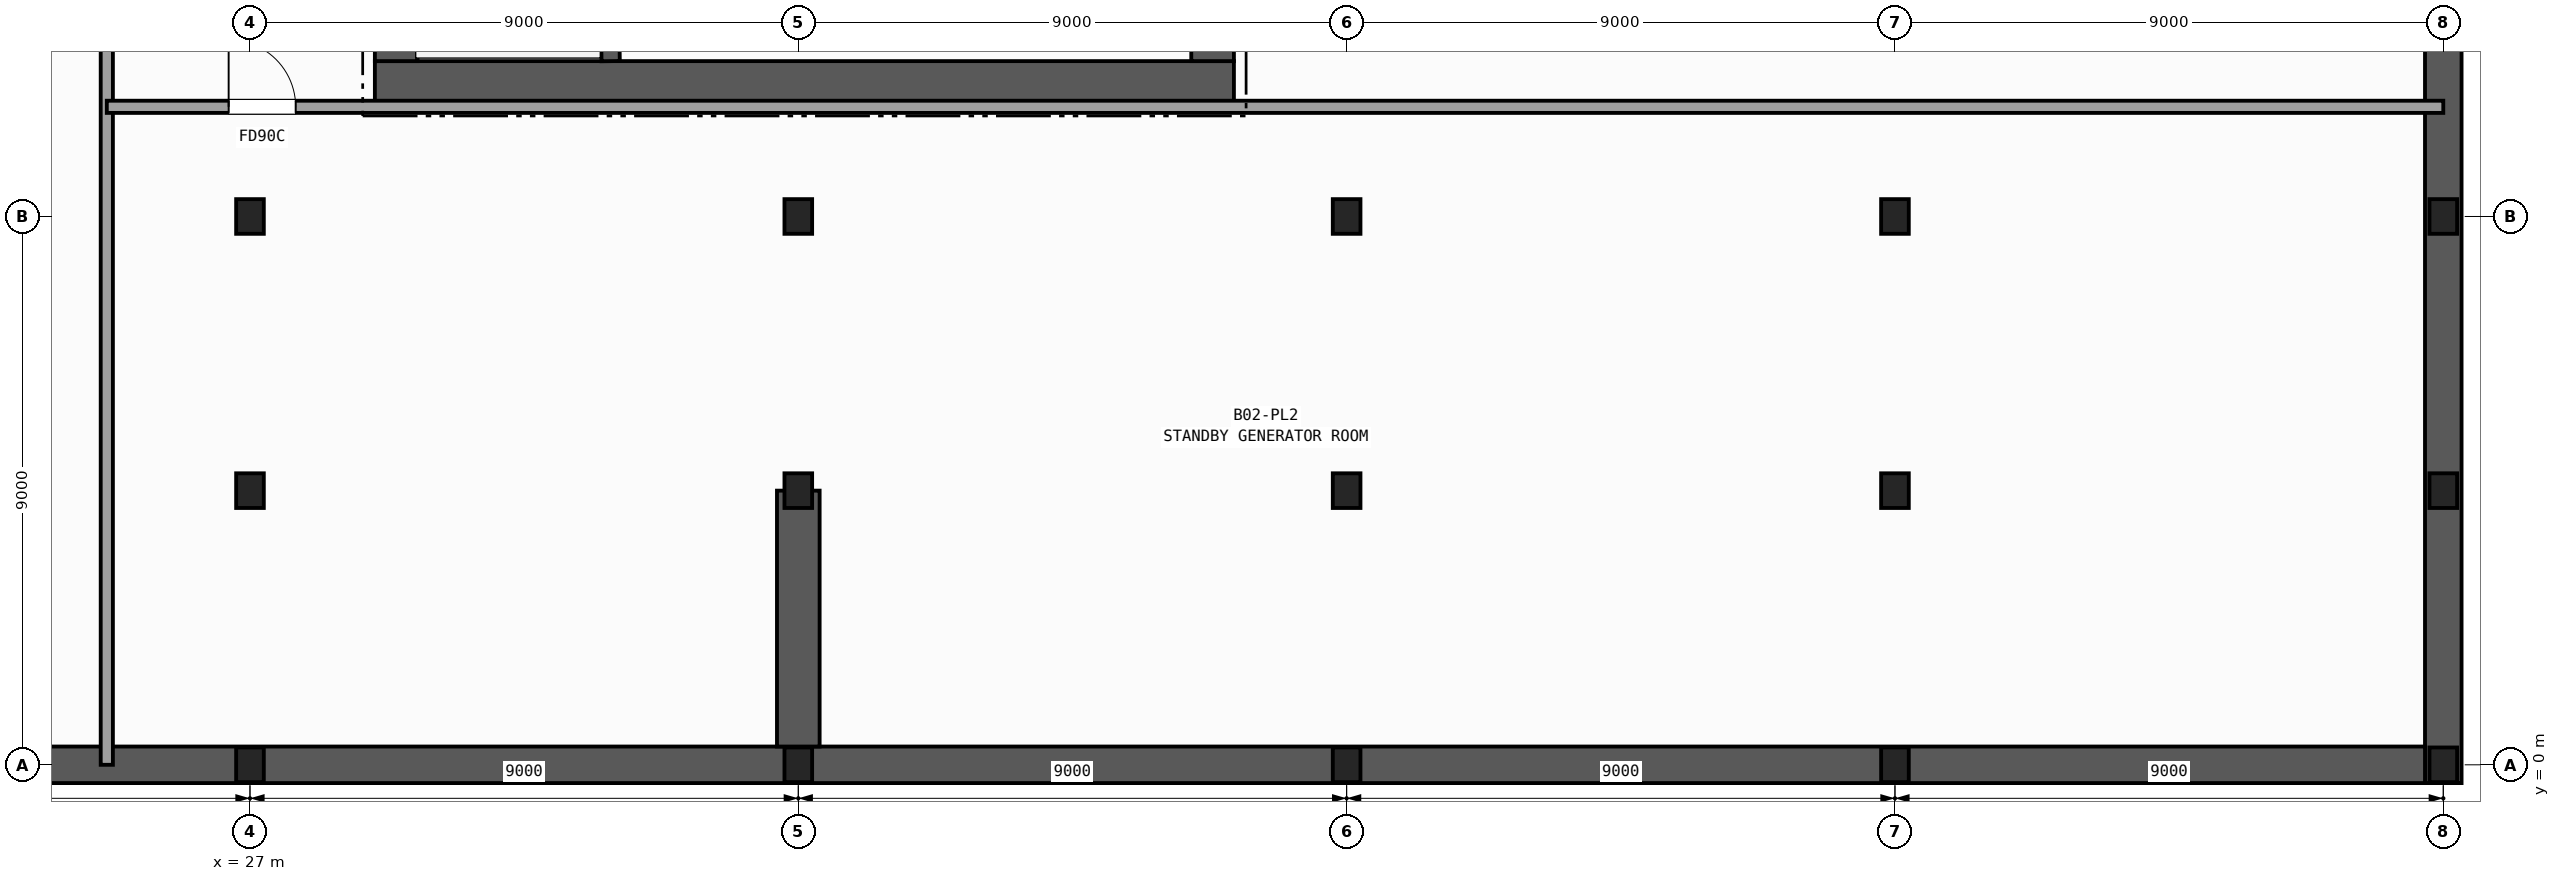
"""IFC4 building model, lengths in metres.
Left out: names, types, materials, properties, quantities, classifications, styles, units other than length and angle.
Written with IfcOpenShell. Run it as: python <this file> out.ifc"""

import sys

from ifc_helpers import new_model, si_unit, direction, frame, frame_2d, origin, origin_2d, place, context, subcontext, project, spatial, rectangle, i_section, extrude, element, fill, save


model = new_model("IFC4")
c1 = context("Model", 3, precision=1e-05, world=origin(), true_north=direction((0.0, 1.0)))
c2 = subcontext(c1, "Body", "Model", "MODEL_VIEW")
j1 = project(units=[si_unit("LENGTHUNIT", "METRE"), si_unit("PLANEANGLEUNIT", "RADIAN")], contexts=[c1])
p1 = place(None, origin())
s1 = spatial("IfcSite", under=j1, at=p1, CompositionType="ELEMENT")
p2 = place(p1, origin())
s2 = spatial("IfcBuilding", under=s1, at=p2, CompositionType="ELEMENT")
p3 = place(p2, frame((0.0, 0.0, -9.0)))
s3 = spatial("IfcBuildingStorey", under=s2, at=p3, CompositionType="ELEMENT", Elevation=-9.0)
for number, where, z_axis, x_axis in (
    (1, (27.0, 0.0, 0.0), (0.0, 0.0, 1.0), (1.0, 0.0, 0.0)),
    (2, (27.0, 9.0, 0.0), (0.0, 0.0, 1.0), (1.0, 0.0, 0.0)),
    (3, (36.0, 0.0, 0.0), (0.0, 0.0, 1.0), (1.0, 0.0, 0.0)),
    (4, (36.0, 9.0, 0.0), (0.0, 0.0, 1.0), (1.0, 0.0, 0.0)),
    (5, (45.0, 0.0, 0.0), (0.0, 0.0, 1.0), (1.0, 0.0, 0.0)),
    (6, (45.0, 9.0, 0.0), (0.0, 0.0, 1.0), (1.0, 0.0, 0.0)),
    (7, (54.0, 0.0, 0.0), (0.0, 0.0, 1.0), (1.0, 0.0, 0.0)),
    (8, (54.0, 9.0, 0.0), (0.0, 0.0, 1.0), (1.0, 0.0, 0.0)),
    (9, (63.0, 0.0, 0.0), (0.0, 0.0, 1.0), (1.0, 0.0, 0.0)),
    (10, (63.0, 9.0, 0.0), (0.0, 0.0, 1.0), (1.0, 0.0, 0.0)),
    (11, (27.0, 4.5, 0.0), (0.0, 0.0, 1.0), (1.0, 0.0, 0.0)),
    (12, (36.0, 4.5, 0.0), (0.0, 0.0, 1.0), (1.0, 0.0, 0.0)),
    (13, (45.0, 4.5, 0.0), (0.0, 0.0, 1.0), (1.0, 0.0, 0.0)),
    (14, (54.0, 4.5, 0.0), (0.0, 0.0, 1.0), (1.0, 0.0, 0.0)),
    (15, (63.0, 4.5, 0.0), (0.0, 0.0, 1.0), (1.0, 0.0, 0.0)),
):
    element("IfcColumn", number, at=place(p3, frame(where, z_axis=z_axis, x_axis=x_axis)), inside=s3, PredefinedType="COLUMN", context=c2, shape_type="SweptSolid", body=[
        extrude(i_section(OverallWidth=0.454, OverallDepth=0.569, WebThickness=0.078, FlangeThickness=0.125, FilletRadius=0.015, at=origin_2d()), origin(), (0.0, 0.0, 1.0), 4.5),
    ])
p4 = place(p3, frame((63.0, 54.3, 0.0), z_axis=(0.0, 0.0, 1.0), x_axis=(0.0, -1.0, 0.0)))
e16 = element("IfcWall", 16, at=p4, inside=s3, PredefinedType="SOLIDWALL", context=c2, shape_type="SweptSolid", body=[
    extrude(rectangle(XDim=54.6, YDim=0.6, at=frame_2d((27.3, 0.0))), origin(), (0.0, 0.0, 1.0), 4.15),
])
p5 = place(p3, frame((62.7, 0.0, 0.0), z_axis=(0.0, 0.0, 1.0), x_axis=(-1.0, 0.0, 0.0)))
e17 = element("IfcWall", 17, at=p5, inside=s3, PredefinedType="SOLIDWALL", context=c2, shape_type="SweptSolid", body=[
    extrude(rectangle(XDim=62.4, YDim=0.6, at=frame_2d((31.2, 0.0))), origin(), (0.0, 0.0, 1.0), 4.15),
])
p6 = place(p3, frame((36.0, 0.3, 0.0), z_axis=(0.0, 0.0, 1.0), x_axis=(0.0, 1.0, 0.0)))
e18 = element("IfcWall", 18, at=p6, inside=s3, PredefinedType="SHEAR", context=c2, shape_type="SweptSolid", body=[
    extrude(rectangle(XDim=4.2, YDim=0.7, at=frame_2d((2.1, 0.0))), origin(), (0.0, 0.0, 1.0), 4.15),
])
p7 = place(p3, frame((29.05, 11.2, 0.0), z_axis=(0.0, 0.0, 1.0), x_axis=(1.0, 0.0, 0.0)))
e19 = element("IfcWall", 19, at=p7, inside=s3, PredefinedType="SHEAR", context=c2, shape_type="SweptSolid", body=[
    extrude(rectangle(XDim=14.1, YDim=0.7, at=frame_2d((7.05, 0.0))), origin(), (0.0, 0.0, 1.0), 4.15),
])
p8 = place(p3, frame((29.4, 24.25, 0.0), z_axis=(0.0, 0.0, 1.0), x_axis=(0.0, -1.0, 0.0)))
e20 = element("IfcWall", 20, at=p8, inside=s3, PredefinedType="SHEAR", context=c2, shape_type="SweptSolid", body=[
    extrude(rectangle(XDim=12.7, YDim=0.7, at=frame_2d((6.35, 0.0))), origin(), (0.0, 0.0, 1.0), 4.15),
])
p9 = place(p8, frame((1.35, 0.0, 0.0)))
e21 = element("IfcOpeningElement", 21, at=p9, cuts=e20, PredefinedType="OPENING", context=c2, shape_type="SweptSolid", body=[
    extrude(rectangle(XDim=1.35, YDim=2.15, at=frame_2d((0.675, 1.075))), frame((0.0, 0.36, 0.0), z_axis=(0.0, -1.0, 0.0), x_axis=(1.0, 0.0, 0.0)), (0.0, 0.0, 1.0), 0.72),
])
p10 = place(p3, frame((42.8, 11.55, 0.0), z_axis=(0.0, 0.0, 1.0), x_axis=(0.0, 1.0, 0.0)))
e22 = element("IfcWall", 22, at=p10, inside=s3, PredefinedType="SHEAR", context=c2, shape_type="SweptSolid", body=[
    extrude(rectangle(XDim=12.7, YDim=0.7, at=frame_2d((6.35, 0.0))), origin(), (0.0, 0.0, 1.0), 4.15),
])
p11 = place(p3, frame((32.92, 11.55, 0.0), z_axis=(0.0, 0.0, 1.0), x_axis=(-0.01331804616, 0.99991131089, 0.0)))
e23 = element("IfcWall", 23, at=p11, inside=s3, PredefinedType="SHEAR", context=c2, shape_type="SweptSolid", body=[
    extrude(rectangle(XDim=9.001, YDim=0.3, at=frame_2d((4.5, 0.0))), origin(), (0.0, 0.0, 1.0), 4.15),
])
p12 = place(p3, frame((24.65, 0.0, 0.0), z_axis=(0.0, 0.0, 1.0), x_axis=(0.0, 1.0, 0.0)))
e24 = element("IfcWall", 24, at=p12, inside=s3, PredefinedType="PARTITIONING", context=c2, shape_type="SweptSolid", body=[
    extrude(rectangle(XDim=28.2, YDim=0.2, at=frame_2d((14.1, 0.0))), origin(), (0.0, 0.0, 1.0), 3.203),
])
p13 = place(p12, frame((13.0, 0.0, 0.0)))
e25 = element("IfcOpeningElement", 25, at=p13, cuts=e24, PredefinedType="OPENING", context=c2, shape_type="SweptSolid", body=[
    extrude(rectangle(XDim=1.1, YDim=2.15, at=frame_2d((0.55, 1.075))), frame((0.0, 0.11, 0.0), z_axis=(0.0, -1.0, 0.0), x_axis=(1.0, 0.0, 0.0)), (0.0, 0.0, 1.0), 0.22),
])
p14 = place(p3, frame((24.65, 10.8, 0.0), z_axis=(0.0, 0.0, 1.0), x_axis=(1.0, 0.0, 0.0)))
e26 = element("IfcWall", 26, at=p14, inside=s3, PredefinedType="PARTITIONING", context=c2, shape_type="SweptSolid", body=[
    extrude(rectangle(XDim=38.35, YDim=0.2, at=frame_2d((19.175, 0.0))), origin(), (0.0, 0.0, 1.0), 3.275),
])
p15 = place(p14, frame((2.0, 0.0, 0.0)))
e27 = element("IfcOpeningElement", 27, at=p15, cuts=e26, PredefinedType="OPENING", context=c2, shape_type="SweptSolid", body=[
    extrude(rectangle(XDim=1.1, YDim=2.15, at=frame_2d((0.55, 1.075))), frame((0.0, 0.11, 0.0), z_axis=(0.0, -1.0, 0.0), x_axis=(1.0, 0.0, 0.0)), (0.0, 0.0, 1.0), 0.22),
])
p16 = place(p15, origin())
e28 = element("IfcDoor", 28, at=p16, inside=s3, OperationType="SINGLE_SWING_LEFT", PredefinedType="DOOR", context=c2, shape_type="SweptSolid", body=[
    extrude(rectangle(XDim=1.1, YDim=2.15, at=frame_2d((0.55, 1.075))), frame((0.0, 0.025, 0.0), z_axis=(0.0, -1.0, 0.0), x_axis=(1.0, 0.0, 0.0)), (0.0, 0.0, 1.0), 0.05),
])
fill(e27, e28)
save(model, sys.argv[1])
